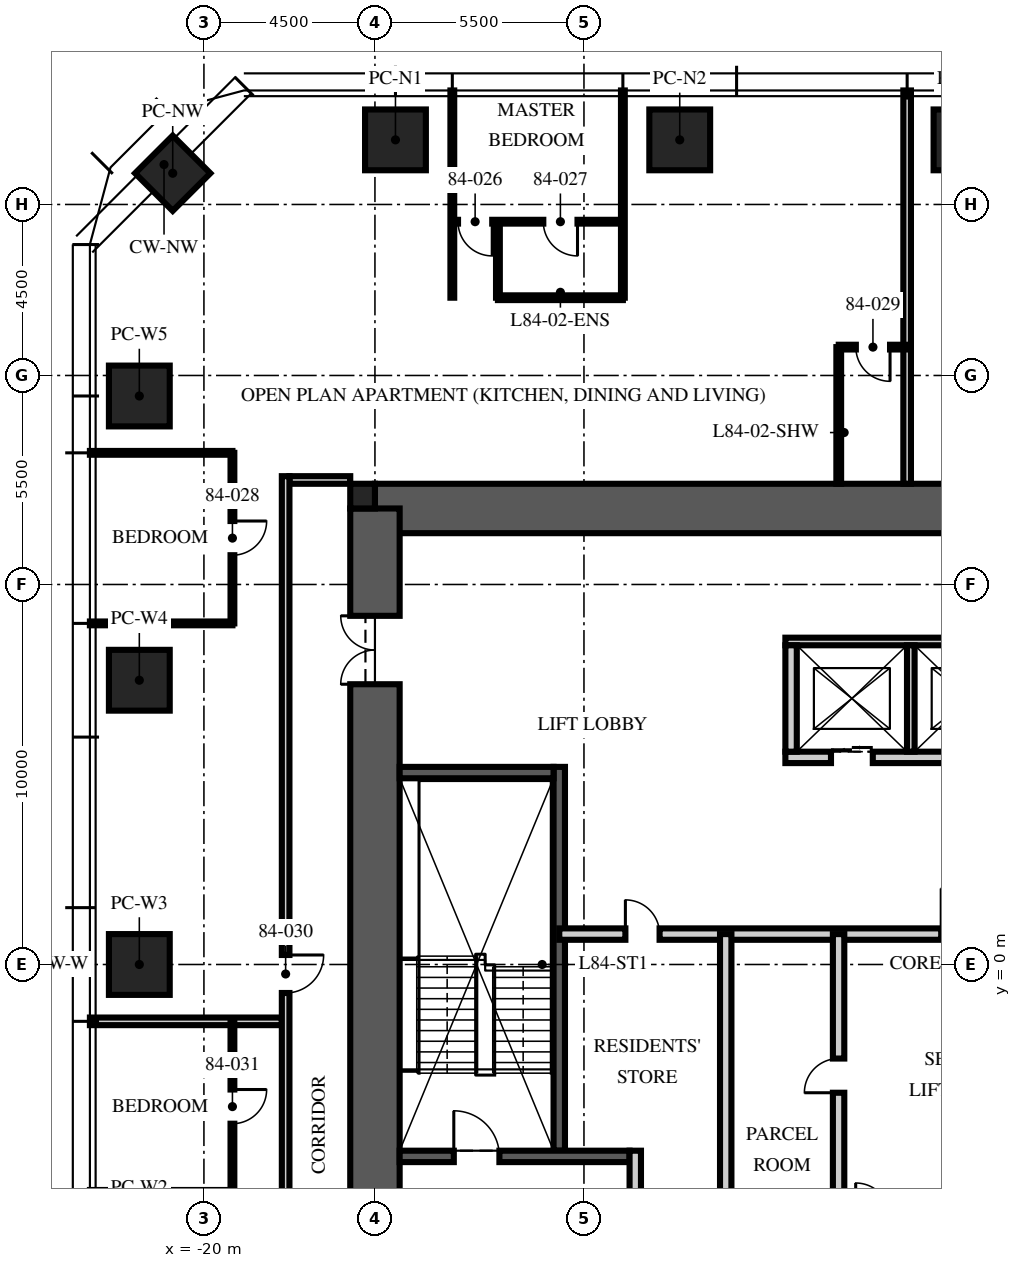
"""IFC4 building model, lengths in metres.
Left out: names, types, materials, properties, quantities, classifications, styles, units other than length and angle.
Written with IfcOpenShell. Run it as: python <this file> out.ifc"""

import sys

from ifc_helpers import new_model, si_unit, direction, frame, frame_2d, origin, origin_2d, place, context, subcontext, project, spatial, rectangle, extrude, element, fill, save


model = new_model("IFC4")
c1 = context("Model", 3, precision=1e-05, world=origin(), true_north=direction((0.0, 1.0)))
c2 = subcontext(c1, "Body", "Model", "MODEL_VIEW")
j1 = project(units=[si_unit("LENGTHUNIT", "METRE"), si_unit("PLANEANGLEUNIT", "RADIAN")], contexts=[c1])
p1 = place(None, origin())
s1 = spatial("IfcSite", under=j1, at=p1, CompositionType="ELEMENT")
p2 = place(p1, origin())
s2 = spatial("IfcBuilding", under=s1, at=p2, CompositionType="ELEMENT")
p3 = place(p2, frame((0.0, 0.0, 334.5)))
s3 = spatial("IfcBuildingStorey", under=s2, at=p3, CompositionType="ELEMENT", Elevation=334.5)
p4 = place(p3, frame((-15.5, 12.0, -0.25), z_axis=(0.0, 0.0, 1.0), x_axis=(1.0, 0.0, 0.0)))
e1 = element("IfcWall", 1, at=p4, inside=s3, PredefinedType="SHEAR", context=c2, shape_type="SweptSolid", body=[
    extrude(rectangle(XDim=31.0, YDim=1.3, at=frame_2d((15.5, 0.0))), origin(), (0.0, 0.0, 1.0), 3.75),
])
p5 = place(p3, frame((-15.5, -12.0, -0.25), z_axis=(0.0, 0.0, 1.0), x_axis=(0.0, 1.0, 0.0)))
e2 = element("IfcWall", 2, at=p5, inside=s3, PredefinedType="SHEAR", context=c2, shape_type="SweptSolid", body=[
    extrude(rectangle(XDim=24.0, YDim=1.3, at=frame_2d((12.0, 0.0))), origin(), (0.0, 0.0, 1.0), 3.75),
])
p6 = place(p5, frame((3.125, 0.0, 0.25)))
e3 = element("IfcOpeningElement", 3, at=p6, cuts=e2, PredefinedType="OPENING", context=c2, shape_type="SweptSolid", body=[
    extrude(rectangle(XDim=1.2, YDim=2.1, at=frame_2d((0.6, 1.05))), frame((0.0, 0.66, 0.0), z_axis=(0.0, -1.0, 0.0), x_axis=(1.0, 0.0, 0.0)), (0.0, 0.0, 1.0), 1.32),
])
p7 = place(p5, frame((19.375, 0.0, 0.25)))
e4 = element("IfcOpeningElement", 4, at=p7, cuts=e2, PredefinedType="OPENING", context=c2, shape_type="SweptSolid", body=[
    extrude(rectangle(XDim=1.8, YDim=2.1, at=frame_2d((0.9, 1.05))), frame((0.0, 0.66, 0.0), z_axis=(0.0, -1.0, 0.0), x_axis=(1.0, 0.0, 0.0)), (0.0, 0.0, 1.0), 1.32),
])
p8 = place(p3, frame((-15.825, 12.325, -0.25), z_axis=(0.0, 0.0, 1.0), x_axis=(1.0, 0.0, 0.0)))
e5 = element("IfcColumn", 5, at=p8, inside=s3, PredefinedType="COLUMN", context=c2, shape_type="SweptSolid", body=[
    extrude(rectangle(XDim=0.65, YDim=0.65, at=origin_2d()), origin(), (0.0, 0.0, 1.0), 3.75),
])
for number, where, z_axis, x_axis in (
    (6, (-14.96, 21.7, 0.0), (0.0, 0.0, 1.0), (1.0, 0.0, 0.0)),
    (7, (-7.48, 21.7, 0.0), (0.0, 0.0, 1.0), (1.0, 0.0, 0.0)),
    (8, (0.0, 21.7, 0.0), (0.0, 0.0, 1.0), (1.0, 0.0, 0.0)),
    (9, (-21.7, 0.0, 0.0), (0.0, 0.0, 1.0), (0.0, 1.0, 0.0)),
    (10, (-21.7, 7.48, 0.0), (0.0, 0.0, 1.0), (0.0, 1.0, 0.0)),
    (11, (-21.7, 14.96, 0.0), (0.0, 0.0, 1.0), (0.0, 1.0, 0.0)),
):
    element("IfcColumn", number, at=place(p3, frame(where, z_axis=z_axis, x_axis=x_axis)), inside=s3, PredefinedType="COLUMN", context=c2, shape_type="SweptSolid", body=[
        extrude(rectangle(XDim=1.6, YDim=1.6, at=origin_2d()), origin(), (0.0, 0.0, 1.0), 3.75),
    ])
p9 = place(p3, frame((-20.821, 20.821, 0.0), z_axis=(0.0, 0.0, 1.0), x_axis=(0.707106781187, 0.707106781187, 0.0)))
e12 = element("IfcColumn", 12, at=p9, inside=s3, PredefinedType="COLUMN", context=c2, shape_type="SweptSolid", body=[
    extrude(rectangle(XDim=1.4, YDim=1.4, at=origin_2d()), origin(), (0.0, 0.0, 1.0), 3.75),
])
p10 = place(p3, frame((-10.65, -4.9, 0.0), z_axis=(0.0, 0.0, 1.0), x_axis=(0.0, 1.0, 0.0)))
e13 = element("IfcWall", 13, at=p10, inside=s3, PredefinedType="SOLIDWALL", context=c2, shape_type="SweptSolid", body=[
    extrude(rectangle(XDim=10.1, YDim=0.3, at=frame_2d((5.05, 0.0))), origin(), (0.0, 0.0, 1.0), 3.5),
])
p11 = place(p3, frame((-14.85, -5.05, 0.0), z_axis=(0.0, 0.0, 1.0), x_axis=(1.0, 0.0, 0.0)))
e14 = element("IfcWall", 14, at=p11, inside=s3, PredefinedType="SOLIDWALL", context=c2, shape_type="SweptSolid", body=[
    extrude(rectangle(XDim=6.05, YDim=0.3, at=frame_2d((3.025, 0.0))), origin(), (0.0, 0.0, 1.0), 3.5),
])
p12 = place(p11, frame((1.425, 0.0, 0.0)))
e15 = element("IfcOpeningElement", 15, at=p12, cuts=e14, PredefinedType="OPENING", context=c2, shape_type="SweptSolid", body=[
    extrude(rectangle(XDim=1.2, YDim=2.1, at=frame_2d((0.6, 1.05))), frame((0.0, 0.16, 0.0), z_axis=(0.0, -1.0, 0.0), x_axis=(1.0, 0.0, 0.0)), (0.0, 0.0, 1.0), 0.32),
])
p13 = place(p3, frame((-14.85, 5.05, 0.0), z_axis=(0.0, 0.0, 1.0), x_axis=(1.0, 0.0, 0.0)))
e16 = element("IfcWall", 16, at=p13, inside=s3, PredefinedType="SOLIDWALL", context=c2, shape_type="SweptSolid", body=[
    extrude(rectangle(XDim=4.05, YDim=0.3, at=frame_2d((2.025, 0.0))), origin(), (0.0, 0.0, 1.0), 3.5),
])
p14 = place(p3, frame((-8.65, -11.35, 0.0), z_axis=(0.0, 0.0, 1.0), x_axis=(0.0, 1.0, 0.0)))
e17 = element("IfcWall", 17, at=p14, inside=s3, PredefinedType="PARTITIONING", context=c2, shape_type="SweptSolid", body=[
    extrude(rectangle(XDim=6.45, YDim=0.3, at=frame_2d((3.225, 0.0))), origin(), (0.0, 0.0, 1.0), 3.5),
])
p15 = place(p14, frame((2.6, 0.0, 0.0)))
e18 = element("IfcOpeningElement", 18, at=p15, cuts=e17, PredefinedType="OPENING", context=c2, shape_type="SweptSolid", body=[
    extrude(rectangle(XDim=1.1, YDim=2.1, at=frame_2d((0.55, 1.05))), frame((0.0, 0.16, 0.0), z_axis=(0.0, -1.0, 0.0), x_axis=(1.0, 0.0, 0.0)), (0.0, 0.0, 1.0), 0.32),
])
p16 = place(p3, frame((-4.7, 5.45, 0.0), z_axis=(0.0, 0.0, 1.0), x_axis=(1.0, 0.0, 0.0)))
e19 = element("IfcWall", 19, at=p16, inside=s3, PredefinedType="PARTITIONING", context=c2, shape_type="SweptSolid", body=[
    extrude(rectangle(XDim=9.7, YDim=0.3, at=frame_2d((4.85, 0.0))), origin(), (0.0, 0.0, 1.0), 3.5),
])
p17 = place(p16, frame((1.2, 0.0, 0.0)))
e20 = element("IfcOpeningElement", 20, at=p17, cuts=e19, PredefinedType="OPENING", context=c2, shape_type="SweptSolid", body=[
    extrude(rectangle(XDim=1.1, YDim=2.1, at=frame_2d((0.55, 1.05))), frame((0.0, 0.16, 0.0), z_axis=(0.0, -1.0, 0.0), x_axis=(1.0, 0.0, 0.0)), (0.0, 0.0, 1.0), 0.32),
])
p18 = place(p16, frame((4.3, 0.0, 0.0)))
e21 = element("IfcOpeningElement", 21, at=p18, cuts=e19, PredefinedType="OPENING", context=c2, shape_type="SweptSolid", body=[
    extrude(rectangle(XDim=1.1, YDim=2.1, at=frame_2d((0.55, 1.05))), frame((0.0, 0.16, 0.0), z_axis=(0.0, -1.0, 0.0), x_axis=(1.0, 0.0, 0.0)), (0.0, 0.0, 1.0), 0.32),
])
p19 = place(p16, frame((7.4, 0.0, 0.0)))
e22 = element("IfcOpeningElement", 22, at=p19, cuts=e19, PredefinedType="OPENING", context=c2, shape_type="SweptSolid", body=[
    extrude(rectangle(XDim=1.1, YDim=2.1, at=frame_2d((0.55, 1.05))), frame((0.0, 0.16, 0.0), z_axis=(0.0, -1.0, 0.0), x_axis=(1.0, 0.0, 0.0)), (0.0, 0.0, 1.0), 0.32),
])
p20 = place(p3, frame((-4.7, 8.5, 0.0), z_axis=(0.0, 0.0, 1.0), x_axis=(1.0, 0.0, 0.0)))
e23 = element("IfcWall", 23, at=p20, inside=s3, PredefinedType="PARTITIONING", context=c2, shape_type="SweptSolid", body=[
    extrude(rectangle(XDim=9.7, YDim=0.2, at=frame_2d((4.85, 0.0))), origin(), (0.0, 0.0, 1.0), 3.5),
])
p21 = place(p3, frame((-4.55, 5.6, 0.0), z_axis=(0.0, 0.0, 1.0), x_axis=(0.0, 1.0, 0.0)))
e24 = element("IfcWall", 24, at=p21, inside=s3, PredefinedType="PARTITIONING", context=c2, shape_type="SweptSolid", body=[
    extrude(rectangle(XDim=2.8, YDim=0.3, at=frame_2d((1.4, 0.0))), origin(), (0.0, 0.0, 1.0), 3.5),
])
p22 = place(p3, frame((-1.4, 5.6, 0.0), z_axis=(0.0, 0.0, 1.0), x_axis=(0.0, 1.0, 0.0)))
e25 = element("IfcWall", 25, at=p22, inside=s3, PredefinedType="PARTITIONING", context=c2, shape_type="SweptSolid", body=[
    extrude(rectangle(XDim=2.8, YDim=0.2, at=frame_2d((1.4, 0.0))), origin(), (0.0, 0.0, 1.0), 3.5),
])
p23 = place(p3, frame((-10.65, 0.8, 0.0), z_axis=(0.0, 0.0, 1.0), x_axis=(1.0, 0.0, 0.0)))
e26 = element("IfcWall", 26, at=p23, inside=s3, PredefinedType="PARTITIONING", context=c2, shape_type="SweptSolid", body=[
    extrude(rectangle(XDim=21.3, YDim=0.3, at=frame_2d((10.65, 0.0))), origin(), (0.0, 0.0, 1.0), 3.5),
])
p24 = place(p23, frame((10.05, 0.0, 0.0)))
e27 = element("IfcOpeningElement", 27, at=p24, cuts=e26, PredefinedType="OPENING", context=c2, shape_type="SweptSolid", body=[
    extrude(rectangle(XDim=1.2, YDim=2.1, at=frame_2d((0.6, 1.05))), frame((0.0, 0.16, 0.0), z_axis=(0.0, -1.0, 0.0), x_axis=(1.0, 0.0, 0.0)), (0.0, 0.0, 1.0), 0.32),
])
p25 = place(p23, frame((1.74, 0.0, 0.0)))
e28 = element("IfcOpeningElement", 28, at=p25, cuts=e26, PredefinedType="OPENING", context=c2, shape_type="SweptSolid", body=[
    extrude(rectangle(XDim=0.9, YDim=2.1, at=frame_2d((0.45, 1.05))), frame((0.0, 0.16, 0.0), z_axis=(0.0, -1.0, 0.0), x_axis=(1.0, 0.0, 0.0)), (0.0, 0.0, 1.0), 0.32),
])
p26 = place(p3, frame((-3.3, -6.65, 0.0), z_axis=(0.0, 0.0, 1.0), x_axis=(0.0, 1.0, 0.0)))
e29 = element("IfcWall", 29, at=p26, inside=s3, PredefinedType="PARTITIONING", context=c2, shape_type="SweptSolid", body=[
    extrude(rectangle(XDim=7.45, YDim=0.3, at=frame_2d((3.725, 0.0))), origin(), (0.0, 0.0, 1.0), 3.5),
])
p27 = place(p26, frame((3.275, 0.0, 0.0)))
e30 = element("IfcOpeningElement", 30, at=p27, cuts=e29, PredefinedType="OPENING", context=c2, shape_type="SweptSolid", body=[
    extrude(rectangle(XDim=0.9, YDim=2.1, at=frame_2d((0.45, 1.05))), frame((0.0, 0.16, 0.0), z_axis=(0.0, -1.0, 0.0), x_axis=(1.0, 0.0, 0.0)), (0.0, 0.0, 1.0), 0.32),
])
p28 = place(p3, frame((-6.27, -6.65, 0.0), z_axis=(0.0, 0.0, 1.0), x_axis=(0.0, 1.0, 0.0)))
e31 = element("IfcWall", 31, at=p28, inside=s3, PredefinedType="PARTITIONING", context=c2, shape_type="SweptSolid", body=[
    extrude(rectangle(XDim=7.45, YDim=0.3, at=frame_2d((3.725, 0.0))), origin(), (0.0, 0.0, 1.0), 3.5),
])
p29 = place(p3, frame((-16.15, 12.75, 0.0), z_axis=(0.0, 0.0, 1.0), x_axis=(-1.0, 0.0, 0.0)))
e32 = element("IfcWall", 32, at=p29, inside=s3, PredefinedType="PARTITIONING", context=c2, shape_type="SweptSolid", body=[
    extrude(rectangle(XDim=1.6, YDim=0.2, at=frame_2d((0.8, 0.0))), origin(), (0.0, 0.0, 1.0), 2.6),
])
p30 = place(p3, frame((-1.496, 12.65, 0.0), z_axis=(0.0, 0.0, 1.0), x_axis=(0.0, 1.0, 0.0)))
e33 = element("IfcWall", 33, at=p30, inside=s3, PredefinedType="PARTITIONING", context=c2, shape_type="SweptSolid", body=[
    extrude(rectangle(XDim=10.35, YDim=0.2, at=frame_2d((5.175, 0.0))), origin(), (0.0, 0.0, 1.0), 3.01),
])
for number, where, z_axis, x_axis in (
    (34, (-8.976, 17.546, 0.0), (0.0, 0.0, 1.0), (0.0, 1.0, 0.0)),
    (35, (-13.464, 17.546, 0.0), (0.0, 0.0, 1.0), (0.0, 1.0, 0.0)),
):
    element("IfcWall", number, at=place(p3, frame(where, z_axis=z_axis, x_axis=x_axis)), inside=s3, PredefinedType="PARTITIONING", context=c2, shape_type="SweptSolid", body=[
        extrude(rectangle(XDim=5.454, YDim=0.1, at=frame_2d((2.727, 0.0))), origin(), (0.0, 0.0, 1.0), 3.01),
    ])
for number, where, z_axis, x_axis in (
    (36, (-19.25, 13.464, 0.0), (0.0, 0.0, 1.0), (-1.0, 0.0, 0.0)),
    (37, (-19.25, 8.976, 0.0), (0.0, 0.0, 1.0), (-1.0, 0.0, 0.0)),
):
    element("IfcWall", number, at=place(p3, frame(where, z_axis=z_axis, x_axis=x_axis)), inside=s3, PredefinedType="PARTITIONING", context=c2, shape_type="SweptSolid", body=[
        extrude(rectangle(XDim=3.75, YDim=0.1, at=frame_2d((1.875, 0.0))), origin(), (0.0, 0.0, 1.0), 3.01),
    ])
p31 = place(p3, frame((-17.95, -1.496, 0.0), z_axis=(0.0, 0.0, 1.0), x_axis=(-1.0, 0.0, 0.0)))
e38 = element("IfcWall", 38, at=p31, inside=s3, PredefinedType="PARTITIONING", context=c2, shape_type="SweptSolid", body=[
    extrude(rectangle(XDim=5.05, YDim=0.2, at=frame_2d((2.525, 0.0))), origin(), (0.0, 0.0, 1.0), 3.01),
])
p32 = place(p3, frame((-8.976, 19.546, 0.0), z_axis=(0.0, 0.0, 1.0), x_axis=(-1.0, 0.0, 0.0)))
e39 = element("IfcWall", 39, at=p32, inside=s3, PredefinedType="PARTITIONING", context=c2, shape_type="SweptSolid", body=[
    extrude(rectangle(XDim=4.488, YDim=0.1, at=frame_2d((2.244, 0.0))), origin(), (0.0, 0.0, 1.0), 2.91),
])
p33 = place(p32, frame((3.438, 0.0, 0.0)))
e40 = element("IfcOpeningElement", 40, at=p33, cuts=e39, PredefinedType="OPENING", context=c2, shape_type="SweptSolid", body=[
    extrude(rectangle(XDim=0.9, YDim=2.1, at=frame_2d((0.45, 1.05))), frame((0.0, 0.06, 0.0), z_axis=(0.0, -1.0, 0.0), x_axis=(1.0, 0.0, 0.0)), (0.0, 0.0, 1.0), 0.12),
])
p34 = place(p32, frame((1.194, 0.0, 0.0)))
e41 = element("IfcOpeningElement", 41, at=p34, cuts=e39, PredefinedType="OPENING", context=c2, shape_type="SweptSolid", body=[
    extrude(rectangle(XDim=0.9, YDim=2.1, at=frame_2d((0.45, 1.05))), frame((0.0, 0.06, 0.0), z_axis=(0.0, -1.0, 0.0), x_axis=(1.0, 0.0, 0.0)), (0.0, 0.0, 1.0), 0.12),
])
p35 = place(p3, frame((-12.264, 17.546, 0.0), z_axis=(0.0, 0.0, 1.0), x_axis=(0.0, 1.0, 0.0)))
e42 = element("IfcWall", 42, at=p35, inside=s3, PredefinedType="PARTITIONING", context=c2, shape_type="SweptSolid", body=[
    extrude(rectangle(XDim=2.0, YDim=0.1, at=frame_2d((1.0, 0.0))), origin(), (0.0, 0.0, 1.0), 3.5),
])
p36 = place(p3, frame((-8.976, 17.546, 0.0), z_axis=(0.0, 0.0, 1.0), x_axis=(-1.0, 0.0, 0.0)))
e43 = element("IfcWall", 43, at=p36, inside=s3, PredefinedType="PARTITIONING", context=c2, shape_type="SweptSolid", body=[
    extrude(rectangle(XDim=3.288, YDim=0.125, at=frame_2d((1.644, 0.0))), origin(), (0.0, 0.0, 1.0), 2.91),
])
p37 = place(p3, frame((-19.25, 13.464, 0.0), z_axis=(0.0, 0.0, 1.0), x_axis=(0.0, -1.0, 0.0)))
e44 = element("IfcWall", 44, at=p37, inside=s3, PredefinedType="PARTITIONING", context=c2, shape_type="SweptSolid", body=[
    extrude(rectangle(XDim=4.488, YDim=0.1, at=frame_2d((2.244, 0.0))), origin(), (0.0, 0.0, 1.0), 2.91),
])
p38 = place(p37, frame((1.794, 0.0, 0.0)))
e45 = element("IfcOpeningElement", 45, at=p38, cuts=e44, PredefinedType="OPENING", context=c2, shape_type="SweptSolid", body=[
    extrude(rectangle(XDim=0.9, YDim=2.1, at=frame_2d((0.45, 1.05))), frame((0.0, 0.06, 0.0), z_axis=(0.0, -1.0, 0.0), x_axis=(1.0, 0.0, 0.0)), (0.0, 0.0, 1.0), 0.12),
])
p39 = place(p3, frame((-1.496, 16.246, 0.0), z_axis=(0.0, 0.0, 1.0), x_axis=(-1.0, 0.0, 0.0)))
e46 = element("IfcWall", 46, at=p39, inside=s3, PredefinedType="PARTITIONING", context=c2, shape_type="SweptSolid", body=[
    extrude(rectangle(XDim=1.8, YDim=0.125, at=frame_2d((0.9, 0.0))), origin(), (0.0, 0.0, 1.0), 3.5),
])
p40 = place(p39, frame((0.45, 0.0, 0.0)))
e47 = element("IfcOpeningElement", 47, at=p40, cuts=e46, PredefinedType="OPENING", context=c2, shape_type="SweptSolid", body=[
    extrude(rectangle(XDim=0.9, YDim=2.1, at=frame_2d((0.45, 1.05))), frame((0.0, 0.073, 0.0), z_axis=(0.0, -1.0, 0.0), x_axis=(1.0, 0.0, 0.0)), (0.0, 0.0, 1.0), 0.145),
])
p41 = place(p3, frame((-3.296, 12.65, 0.0), z_axis=(0.0, 0.0, 1.0), x_axis=(0.0, 1.0, 0.0)))
e48 = element("IfcWall", 48, at=p41, inside=s3, PredefinedType="PARTITIONING", context=c2, shape_type="SweptSolid", body=[
    extrude(rectangle(XDim=3.596, YDim=0.125, at=frame_2d((1.798, 0.0))), origin(), (0.0, 0.0, 1.0), 3.5),
])
p42 = place(p3, frame((-19.25, -1.496, 0.0), z_axis=(0.0, 0.0, 1.0), x_axis=(0.0, -1.0, 0.0)))
e49 = element("IfcWall", 49, at=p42, inside=s3, PredefinedType="PARTITIONING", context=c2, shape_type="SweptSolid", body=[
    extrude(rectangle(XDim=4.488, YDim=0.1, at=frame_2d((2.244, 0.0))), origin(), (0.0, 0.0, 1.0), 2.91),
])
p43 = place(p42, frame((1.794, 0.0, 0.0)))
e50 = element("IfcOpeningElement", 50, at=p43, cuts=e49, PredefinedType="OPENING", context=c2, shape_type="SweptSolid", body=[
    extrude(rectangle(XDim=0.9, YDim=2.1, at=frame_2d((0.45, 1.05))), frame((0.0, 0.06, 0.0), z_axis=(0.0, -1.0, 0.0), x_axis=(1.0, 0.0, 0.0)), (0.0, 0.0, 1.0), 0.12),
])
p44 = place(p3, frame((-17.85, 12.85, 0.0), z_axis=(0.0, 0.0, 1.0), x_axis=(0.0, -1.0, 0.0)))
e51 = element("IfcWall", 51, at=p44, inside=s3, PredefinedType="PARTITIONING", context=c2, shape_type="SweptSolid", body=[
    extrude(rectangle(XDim=25.7, YDim=0.2, at=frame_2d((12.85, 0.0))), origin(), (0.0, 0.0, 1.0), 2.9),
])
p45 = place(p44, frame((12.6, 0.0, 0.0)))
e52 = element("IfcOpeningElement", 52, at=p45, cuts=e51, PredefinedType="OPENING", context=c2, shape_type="SweptSolid", body=[
    extrude(rectangle(XDim=1.0, YDim=2.2, at=frame_2d((0.5, 1.1))), frame((0.0, 0.11, 0.0), z_axis=(0.0, -1.0, 0.0), x_axis=(1.0, 0.0, 0.0)), (0.0, 0.0, 1.0), 0.22),
])
p46 = place(p44, frame((23.366, 0.0, 0.0)))
e53 = element("IfcOpeningElement", 53, at=p46, cuts=e51, PredefinedType="OPENING", context=c2, shape_type="SweptSolid", body=[
    extrude(rectangle(XDim=1.0, YDim=2.2, at=frame_2d((0.5, 1.1))), frame((0.0, 0.11, 0.0), z_axis=(0.0, -1.0, 0.0), x_axis=(1.0, 0.0, 0.0)), (0.0, 0.0, 1.0), 0.22),
])
p47 = place(p12, origin())
e54 = element("IfcDoor", 54, at=p47, inside=s3, OperationType="SINGLE_SWING_LEFT", PredefinedType="DOOR", context=c2, shape_type="SweptSolid", body=[
    extrude(rectangle(XDim=1.2, YDim=2.1, at=frame_2d((0.6, 1.05))), frame((0.0, 0.025, 0.0), z_axis=(0.0, -1.0, 0.0), x_axis=(1.0, 0.0, 0.0)), (0.0, 0.0, 1.0), 0.05),
])
fill(e15, e54)
p48 = place(p7, origin())
e55 = element("IfcDoor", 55, at=p48, inside=s3, OperationType="DOUBLE_DOOR_SINGLE_SWING", PredefinedType="DOOR", context=c2, shape_type="SweptSolid", body=[
    extrude(rectangle(XDim=1.8, YDim=2.1, at=frame_2d((0.9, 1.05))), frame((0.0, 0.025, 0.0), z_axis=(0.0, -1.0, 0.0), x_axis=(1.0, 0.0, 0.0)), (0.0, 0.0, 1.0), 0.05),
])
fill(e4, e55)
p49 = place(p17, origin())
e56 = element("IfcDoor", 56, at=p49, inside=s3, OperationType="DOUBLE_DOOR_SLIDING", PredefinedType="DOOR", context=c2, shape_type="SweptSolid", body=[
    extrude(rectangle(XDim=1.1, YDim=2.1, at=frame_2d((0.55, 1.05))), frame((0.0, 0.025, 0.0), z_axis=(0.0, -1.0, 0.0), x_axis=(1.0, 0.0, 0.0)), (0.0, 0.0, 1.0), 0.05),
])
fill(e20, e56)
p50 = place(p24, origin())
e57 = element("IfcDoor", 57, at=p50, inside=s3, OperationType="SINGLE_SWING_LEFT", PredefinedType="DOOR", context=c2, shape_type="SweptSolid", body=[
    extrude(rectangle(XDim=1.2, YDim=2.1, at=frame_2d((0.6, 1.05))), frame((0.0, 0.025, 0.0), z_axis=(0.0, -1.0, 0.0), x_axis=(1.0, 0.0, 0.0)), (0.0, 0.0, 1.0), 0.05),
])
fill(e27, e57)
p51 = place(p27, origin())
e58 = element("IfcDoor", 58, at=p51, inside=s3, OperationType="SINGLE_SWING_LEFT", PredefinedType="DOOR", context=c2, shape_type="SweptSolid", body=[
    extrude(rectangle(XDim=0.9, YDim=2.1, at=frame_2d((0.45, 1.05))), frame((0.0, 0.025, 0.0), z_axis=(0.0, -1.0, 0.0), x_axis=(1.0, 0.0, 0.0)), (0.0, 0.0, 1.0), 0.05),
])
fill(e30, e58)
p52 = place(p25, origin())
e59 = element("IfcDoor", 59, at=p52, inside=s3, OperationType="SINGLE_SWING_LEFT", PredefinedType="DOOR", context=c2, shape_type="SweptSolid", body=[
    extrude(rectangle(XDim=0.9, YDim=2.1, at=frame_2d((0.45, 1.05))), frame((0.0, 0.025, 0.0), z_axis=(0.0, -1.0, 0.0), x_axis=(1.0, 0.0, 0.0)), (0.0, 0.0, 1.0), 0.05),
])
fill(e28, e59)
p53 = place(p33, origin())
e60 = element("IfcDoor", 60, at=p53, inside=s3, OperationType="SINGLE_SWING_LEFT", PredefinedType="DOOR", context=c2, shape_type="SweptSolid", body=[
    extrude(rectangle(XDim=0.9, YDim=2.1, at=frame_2d((0.45, 1.05))), frame((0.0, 0.025, 0.0), z_axis=(0.0, -1.0, 0.0), x_axis=(1.0, 0.0, 0.0)), (0.0, 0.0, 1.0), 0.05),
])
fill(e40, e60)
p54 = place(p34, origin())
e61 = element("IfcDoor", 61, at=p54, inside=s3, OperationType="SINGLE_SWING_LEFT", PredefinedType="DOOR", context=c2, shape_type="SweptSolid", body=[
    extrude(rectangle(XDim=0.9, YDim=2.1, at=frame_2d((0.45, 1.05))), frame((0.0, 0.025, 0.0), z_axis=(0.0, -1.0, 0.0), x_axis=(1.0, 0.0, 0.0)), (0.0, 0.0, 1.0), 0.05),
])
fill(e41, e61)
p55 = place(p38, origin())
e62 = element("IfcDoor", 62, at=p55, inside=s3, OperationType="SINGLE_SWING_LEFT", PredefinedType="DOOR", context=c2, shape_type="SweptSolid", body=[
    extrude(rectangle(XDim=0.9, YDim=2.1, at=frame_2d((0.45, 1.05))), frame((0.0, 0.025, 0.0), z_axis=(0.0, -1.0, 0.0), x_axis=(1.0, 0.0, 0.0)), (0.0, 0.0, 1.0), 0.05),
])
fill(e45, e62)
p56 = place(p40, origin())
e63 = element("IfcDoor", 63, at=p56, inside=s3, OperationType="SINGLE_SWING_LEFT", PredefinedType="DOOR", context=c2, shape_type="SweptSolid", body=[
    extrude(rectangle(XDim=0.9, YDim=2.1, at=frame_2d((0.45, 1.05))), frame((0.0, 0.025, 0.0), z_axis=(0.0, -1.0, 0.0), x_axis=(1.0, 0.0, 0.0)), (0.0, 0.0, 1.0), 0.05),
])
fill(e47, e63)
p57 = place(p45, origin())
e64 = element("IfcDoor", 64, at=p57, inside=s3, OperationType="SINGLE_SWING_LEFT", PredefinedType="DOOR", context=c2, shape_type="SweptSolid", body=[
    extrude(rectangle(XDim=1.0, YDim=2.2, at=frame_2d((0.5, 1.1))), frame((0.0, 0.025, 0.0), z_axis=(0.0, -1.0, 0.0), x_axis=(1.0, 0.0, 0.0)), (0.0, 0.0, 1.0), 0.05),
])
fill(e52, e64)
p58 = place(p43, origin())
e65 = element("IfcDoor", 65, at=p58, inside=s3, OperationType="SINGLE_SWING_LEFT", PredefinedType="DOOR", context=c2, shape_type="SweptSolid", body=[
    extrude(rectangle(XDim=0.9, YDim=2.1, at=frame_2d((0.45, 1.05))), frame((0.0, 0.025, 0.0), z_axis=(0.0, -1.0, 0.0), x_axis=(1.0, 0.0, 0.0)), (0.0, 0.0, 1.0), 0.05),
])
fill(e50, e65)
save(model, sys.argv[1])
